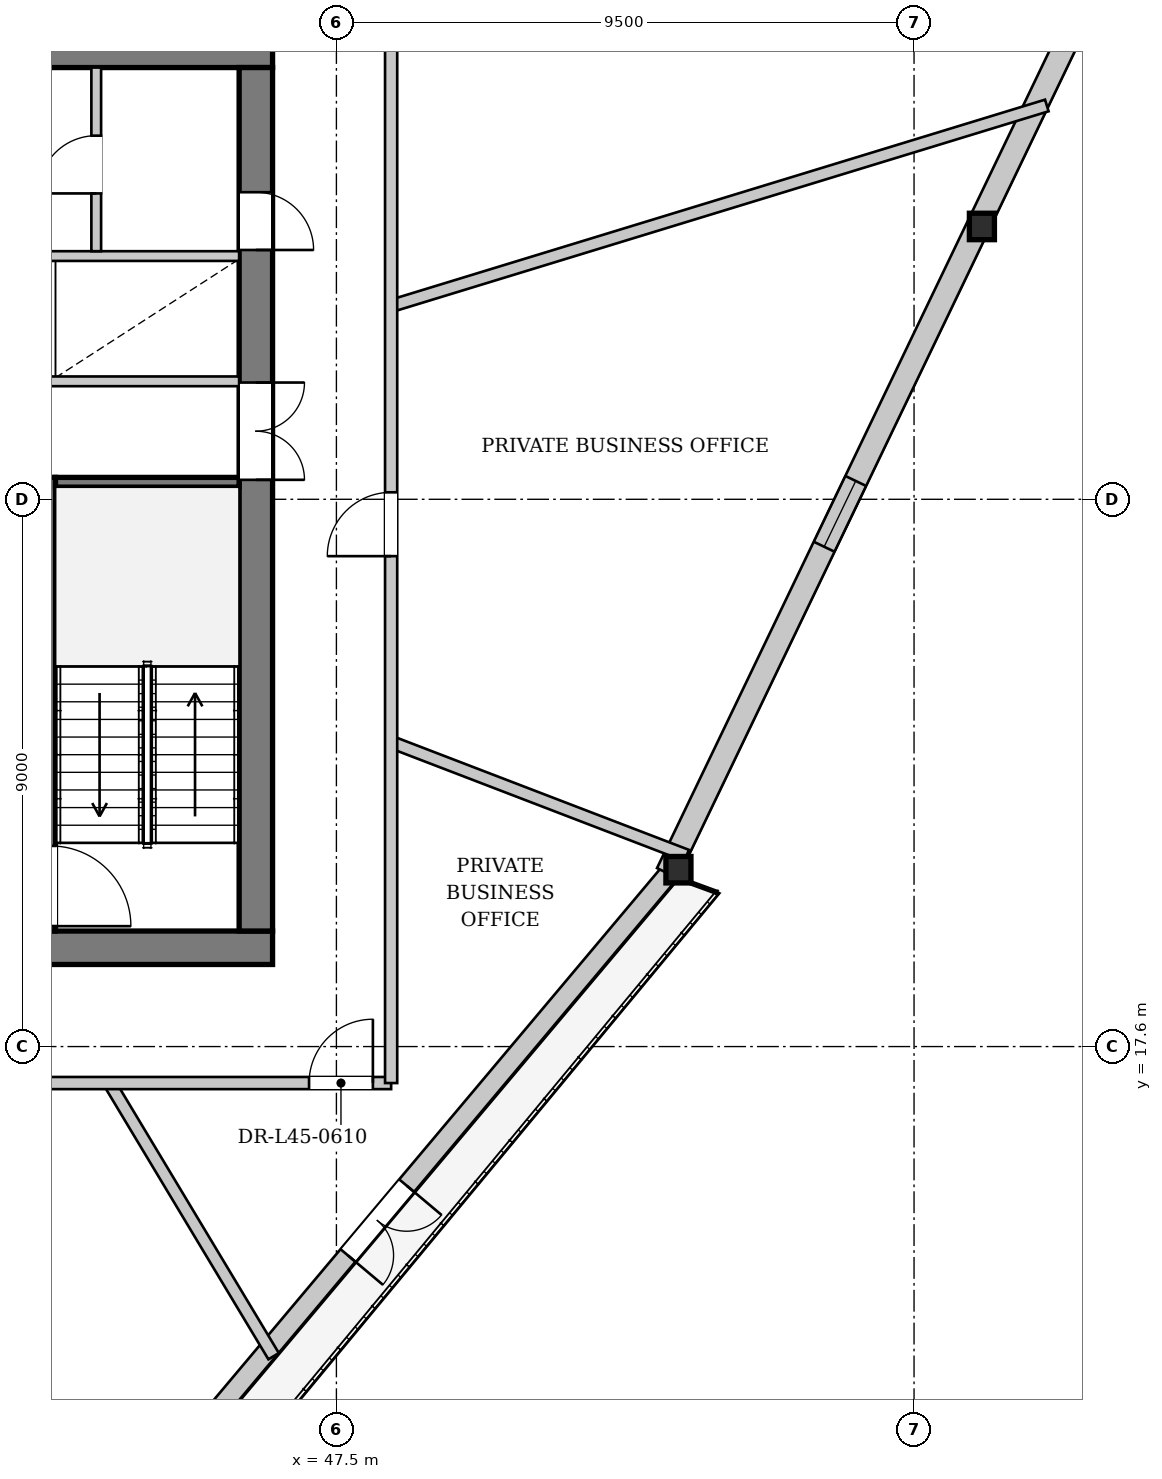
"""IFC4 building model, lengths in metres.
Left out: names, types, materials, properties, quantities, classifications, styles, units other than length and angle.
Written with IfcOpenShell. Run it as: python <this file> out.ifc"""

import sys

from ifc_helpers import new_model, si_unit, direction, frame, frame_2d, origin, origin_2d, place, context, subcontext, project, spatial, rectangle, i_section, extrude, source, transform, mapped, element, fill, save


model = new_model("IFC4")
c1 = context("Model", 3, precision=1e-05, world=origin(), true_north=direction((0.0, 1.0)))
c2 = subcontext(c1, "Body", "Model", "MODEL_VIEW")
j1 = project(units=[si_unit("LENGTHUNIT", "METRE"), si_unit("PLANEANGLEUNIT", "RADIAN")], contexts=[c1])
p1 = place(None, origin())
s1 = spatial("IfcSite", under=j1, at=p1, CompositionType="ELEMENT")
p2 = place(p1, origin())
s2 = spatial("IfcBuilding", under=s1, at=p2, CompositionType="ELEMENT")
p3 = place(p2, frame((0.0, 0.0, 171.45)))
s3 = spatial("IfcBuildingStorey", under=s2, at=p3, CompositionType="ELEMENT", Elevation=171.45)
m1 = source(origin(), c2, "Body", "SweptSolid", [
    extrude(i_section(OverallWidth=0.412, OverallDepth=0.435, WebThickness=0.031, FlangeThickness=0.05, at=origin_2d()), origin(), (0.0, 0.0, 1.0), 3.396),
])
p4 = place(p3, frame((53.115, 20.37, 0.0), z_axis=(0.005750660519, 0.081443729594, 0.996661351119), x_axis=(-0.997516467009, 0.07043364286, 0.0)))
e1 = element("IfcColumn", 1, at=p4, inside=s3, PredefinedType="COLUMN", context=c2, shape_type="MappedRepresentation", body=[
    mapped(m1, transform((0.0, 0.0, 0.0), x_axis=(1.0, 0.0, 0.0), y_axis=(0.0, 1.0, 0.0), z_axis=(0.0, 0.0, 1.0), scale=1.0)),
])
m2 = source(origin(), c2, "Body", "SweptSolid", [
    extrude(i_section(OverallWidth=0.412, OverallDepth=0.435, WebThickness=0.031, FlangeThickness=0.05, at=origin_2d()), origin(), (0.0, 0.0, 1.0), 3.404),
])
p5 = place(p3, frame((58.182, 30.921, 0.0), z_axis=(-0.038804856025, 0.0971914601, 0.994508925668), x_axis=(-0.928712846652, -0.370799741726, 0.0)))
e2 = element("IfcColumn", 2, at=p5, inside=s3, PredefinedType="COLUMN", context=c2, shape_type="MappedRepresentation", body=[
    mapped(m2, transform((0.0, 0.0, 0.0), x_axis=(1.0, 0.0, 0.0), y_axis=(0.0, 1.0, 0.0), z_axis=(0.0, 0.0, 1.0), scale=1.0)),
])
p6 = place(p3, frame((52.993, 20.473, 0.0), z_axis=(0.0, 0.0, 1.0), x_axis=(-0.643470383852, -0.765471008664, 0.0)))
e3 = element("IfcWall", 3, at=p6, inside=s3, PredefinedType="SOLIDWALL", context=c2, shape_type="SweptSolid", body=[
    extrude(rectangle(XDim=23.409, YDim=0.32, at=frame_2d((11.705, 0.0))), origin(), (0.0, 0.0, 1.0), 2.722),
])
p7 = place(p6, frame((6.741, 0.0, 0.0)))
e4 = element("IfcOpeningElement", 4, at=p7, cuts=e3, PredefinedType="OPENING", context=c2, shape_type="SweptSolid", body=[
    extrude(rectangle(XDim=1.5, YDim=2.3, at=frame_2d((0.75, 1.15))), frame((0.0, 0.17, 0.0), z_axis=(0.0, -1.0, 0.0), x_axis=(1.0, 0.0, 0.0)), (0.0, 0.0, 1.0), 0.34),
])
p8 = place(p6, frame((16.023, 0.0, 0.252)))
e5 = element("IfcOpeningElement", 5, at=p8, cuts=e3, PredefinedType="OPENING", context=c2, shape_type="SweptSolid", body=[
    extrude(rectangle(XDim=2.6, YDim=2.35, at=frame_2d((1.3, 1.175))), frame((0.0, 0.17, 0.0), z_axis=(0.0, -1.0, 0.0), x_axis=(1.0, 0.0, 0.0)), (0.0, 0.0, 1.0), 0.34),
])
p9 = place(p3, frame((63.077, 41.555, 0.0), z_axis=(0.0, 0.0, 1.0), x_axis=(-0.432876854569, -0.901453065211, 0.0)))
e6 = element("IfcWall", 6, at=p9, inside=s3, PredefinedType="SOLIDWALL", context=c2, shape_type="SweptSolid", body=[
    extrude(rectangle(XDim=23.409, YDim=0.38, at=frame_2d((11.705, 0.0))), origin(), (0.0, 0.0, 1.0), 2.722),
])
p10 = place(p9, frame((5.955, 0.0, 0.65)))
e7 = element("IfcOpeningElement", 7, at=p10, cuts=e6, PredefinedType="OPENING", context=c2, shape_type="SweptSolid", body=[
    extrude(rectangle(XDim=1.2, YDim=1.5, at=frame_2d((0.6, 0.75))), frame((0.0, 0.2, 0.0), z_axis=(0.0, -1.0, 0.0), x_axis=(1.0, 0.0, 0.0)), (0.0, 0.0, 1.0), 0.4),
])
p11 = place(p9, frame((16.255, 0.0, 0.65)))
e8 = element("IfcOpeningElement", 8, at=p11, cuts=e6, PredefinedType="OPENING", context=c2, shape_type="SweptSolid", body=[
    extrude(rectangle(XDim=1.2, YDim=1.5, at=frame_2d((0.6, 0.75))), frame((0.0, 0.2, 0.0), z_axis=(0.0, -1.0, 0.0), x_axis=(1.0, 0.0, 0.0)), (0.0, 0.0, 1.0), 0.4),
])
p12 = place(p3, frame((46.45, 19.225, 0.0), z_axis=(0.0, 0.0, 1.0), x_axis=(-1.0, 0.0, 0.0)))
e9 = element("IfcWall", 9, at=p12, inside=s3, PredefinedType="SHEAR", context=c2, shape_type="SweptSolid", body=[
    extrude(rectangle(XDim=16.9, YDim=0.55, at=frame_2d((8.45, 0.0))), origin(), (0.0, 0.0, 1.0), 3.33),
])
p13 = place(p12, frame((4.65, 0.0, 0.0)))
e10 = element("IfcOpeningElement", 10, at=p13, cuts=e9, PredefinedType="OPENING", context=c2, shape_type="SweptSolid", body=[
    extrude(rectangle(XDim=1.12, YDim=2.25, at=frame_2d((0.56, 1.125))), frame((0.0, 0.285, 0.0), z_axis=(0.0, -1.0, 0.0), x_axis=(1.0, 0.0, 0.0)), (0.0, 0.0, 1.0), 0.57),
])
p14 = place(p12, frame((11.15, 0.0, 0.0)))
e11 = element("IfcOpeningElement", 11, at=p14, cuts=e9, PredefinedType="OPENING", context=c2, shape_type="SweptSolid", body=[
    extrude(rectangle(XDim=1.12, YDim=2.25, at=frame_2d((0.56, 1.125))), frame((0.0, 0.285, 0.0), z_axis=(0.0, -1.0, 0.0), x_axis=(1.0, 0.0, 0.0)), (0.0, 0.0, 1.0), 0.57),
])
p15 = place(p3, frame((29.55, 33.975, 0.0), z_axis=(0.0, 0.0, 1.0), x_axis=(1.0, 0.0, 0.0)))
e12 = element("IfcWall", 12, at=p15, inside=s3, PredefinedType="SHEAR", context=c2, shape_type="SweptSolid", body=[
    extrude(rectangle(XDim=16.9, YDim=0.55, at=frame_2d((8.45, 0.0))), origin(), (0.0, 0.0, 1.0), 3.33),
])
p16 = place(p15, frame((1.55, 0.0, 0.0)))
e13 = element("IfcOpeningElement", 13, at=p16, cuts=e12, PredefinedType="OPENING", context=c2, shape_type="SweptSolid", body=[
    extrude(rectangle(XDim=0.95, YDim=2.1, at=frame_2d((0.475, 1.05))), frame((0.0, 0.285, 0.0), z_axis=(0.0, -1.0, 0.0), x_axis=(1.0, 0.0, 0.0)), (0.0, 0.0, 1.0), 0.57),
])
p17 = place(p15, frame((3.93, 0.0, 0.0)))
e14 = element("IfcOpeningElement", 14, at=p17, cuts=e12, PredefinedType="OPENING", context=c2, shape_type="SweptSolid", body=[
    extrude(rectangle(XDim=1.32, YDim=2.2, at=frame_2d((0.66, 1.1))), frame((0.0, 0.285, 0.0), z_axis=(0.0, -1.0, 0.0), x_axis=(1.0, 0.0, 0.0)), (0.0, 0.0, 1.0), 0.57),
])
p18 = place(p3, frame((46.175, 33.7, 0.0), z_axis=(0.0, 0.0, 1.0), x_axis=(0.0, -1.0, 0.0)))
e15 = element("IfcWall", 15, at=p18, inside=s3, PredefinedType="SHEAR", context=c2, shape_type="SweptSolid", body=[
    extrude(rectangle(XDim=14.2, YDim=0.55, at=frame_2d((7.1, 0.0))), origin(), (0.0, 0.0, 1.0), 3.33),
])
p19 = place(p18, frame((5.18, 0.0, 0.0)))
e16 = element("IfcOpeningElement", 16, at=p19, cuts=e15, PredefinedType="OPENING", context=c2, shape_type="SweptSolid", body=[
    extrude(rectangle(XDim=1.6, YDim=2.2, at=frame_2d((0.8, 1.1))), frame((0.0, 0.285, 0.0), z_axis=(0.0, -1.0, 0.0), x_axis=(1.0, 0.0, 0.0)), (0.0, 0.0, 1.0), 0.57),
])
p20 = place(p18, frame((2.05, 0.0, 0.0)))
e17 = element("IfcOpeningElement", 17, at=p20, cuts=e15, PredefinedType="OPENING", context=c2, shape_type="SweptSolid", body=[
    extrude(rectangle(XDim=0.95, YDim=2.1, at=frame_2d((0.475, 1.05))), frame((0.0, 0.285, 0.0), z_axis=(0.0, -1.0, 0.0), x_axis=(1.0, 0.0, 0.0)), (0.0, 0.0, 1.0), 0.57),
])
p21 = place(p3, frame((42.8, 26.96, 0.0), z_axis=(0.0, 0.0, 1.0), x_axis=(0.0, -1.0, 0.0)))
e18 = element("IfcWall", 18, at=p21, inside=s3, PredefinedType="PARTITIONING", context=c2, shape_type="SweptSolid", body=[
    extrude(rectangle(XDim=7.46, YDim=0.16, at=frame_2d((3.73, 0.0))), origin(), (0.0, 0.0, 1.0), 3.33),
])
p22 = place(p21, frame((6.06, 0.0, 0.0)))
e19 = element("IfcOpeningElement", 19, at=p22, cuts=e18, PredefinedType="OPENING", context=c2, shape_type="SweptSolid", body=[
    extrude(rectangle(XDim=1.32, YDim=2.2, at=frame_2d((0.66, 1.1))), frame((0.0, 0.09, 0.0), z_axis=(0.0, -1.0, 0.0), x_axis=(1.0, 0.0, 0.0)), (0.0, 0.0, 1.0), 0.18),
])
p23 = place(p3, frame((42.88, 26.88, 0.0), z_axis=(0.0, 0.0, 1.0), x_axis=(1.0, 0.0, 0.0)))
e20 = element("IfcWall", 20, at=p23, inside=s3, PredefinedType="PARTITIONING", context=c2, shape_type="SweptSolid", body=[
    extrude(rectangle(XDim=3.02, YDim=0.16, at=frame_2d((1.51, 0.0))), origin(), (0.0, 0.0, 1.0), 3.33),
])
p24 = place(p3, frame((33.28, 28.54, 0.0), z_axis=(0.0, 0.0, 1.0), x_axis=(1.0, 0.0, 0.0)))
e21 = element("IfcWall", 21, at=p24, inside=s3, PredefinedType="PARTITIONING", context=c2, shape_type="SweptSolid", body=[
    extrude(rectangle(XDim=12.62, YDim=0.16, at=frame_2d((6.31, 0.0))), origin(), (0.0, 0.0, 1.0), 3.33),
])
p25 = place(p24, frame((0.26, 0.0, 0.0)))
e22 = element("IfcOpeningElement", 22, at=p25, cuts=e21, PredefinedType="OPENING", context=c2, shape_type="SweptSolid", body=[
    extrude(rectangle(XDim=1.1, YDim=2.2, at=frame_2d((0.55, 1.1))), frame((0.0, 0.09, 0.0), z_axis=(0.0, -1.0, 0.0), x_axis=(1.0, 0.0, 0.0)), (0.0, 0.0, 1.0), 0.18),
])
p26 = place(p24, frame((2.01, 0.0, 0.0)))
e23 = element("IfcOpeningElement", 23, at=p26, cuts=e21, PredefinedType="OPENING", context=c2, shape_type="SweptSolid", body=[
    extrude(rectangle(XDim=1.1, YDim=2.2, at=frame_2d((0.55, 1.1))), frame((0.0, 0.09, 0.0), z_axis=(0.0, -1.0, 0.0), x_axis=(1.0, 0.0, 0.0)), (0.0, 0.0, 1.0), 0.18),
])
p27 = place(p24, frame((3.76, 0.0, 0.0)))
e24 = element("IfcOpeningElement", 24, at=p27, cuts=e21, PredefinedType="OPENING", context=c2, shape_type="SweptSolid", body=[
    extrude(rectangle(XDim=1.1, YDim=2.2, at=frame_2d((0.55, 1.1))), frame((0.0, 0.09, 0.0), z_axis=(0.0, -1.0, 0.0), x_axis=(1.0, 0.0, 0.0)), (0.0, 0.0, 1.0), 0.18),
])
p28 = place(p3, frame((40.72, 30.6, 0.0), z_axis=(0.0, 0.0, 1.0), x_axis=(1.0, 0.0, 0.0)))
e25 = element("IfcWall", 25, at=p28, inside=s3, PredefinedType="PARTITIONING", context=c2, shape_type="SweptSolid", body=[
    extrude(rectangle(XDim=5.18, YDim=0.16, at=frame_2d((2.59, 0.0))), origin(), (0.0, 0.0, 1.0), 3.33),
])
p29 = place(p3, frame((43.55, 30.68, 0.0), z_axis=(0.0, 0.0, 1.0), x_axis=(0.0, 1.0, 0.0)))
e26 = element("IfcWall", 26, at=p29, inside=s3, PredefinedType="PARTITIONING", context=c2, shape_type="SweptSolid", body=[
    extrude(rectangle(XDim=3.02, YDim=0.16, at=frame_2d((1.51, 0.0))), origin(), (0.0, 0.0, 1.0), 3.33),
])
p30 = place(p29, frame((0.95, 0.0, 0.0)))
e27 = element("IfcOpeningElement", 27, at=p30, cuts=e26, PredefinedType="OPENING", context=c2, shape_type="SweptSolid", body=[
    extrude(rectangle(XDim=0.95, YDim=2.1, at=frame_2d((0.475, 1.05))), frame((0.0, 0.09, 0.0), z_axis=(0.0, -1.0, 0.0), x_axis=(1.0, 0.0, 0.0)), (0.0, 0.0, 1.0), 0.18),
])
p31 = place(p3, frame((43.768, 17.0, 0.0), z_axis=(0.0, 0.0, 1.0), x_axis=(0.515030046978, -0.857172124319, 0.0)))
e28 = element("IfcWall", 28, at=p31, inside=s3, PredefinedType="PARTITIONING", context=c2, shape_type="SweptSolid", body=[
    extrude(rectangle(XDim=5.24, YDim=0.2, at=frame_2d((2.62, 0.0))), origin(), (0.0, 0.0, 1.0), 3.33),
])
p32 = place(p3, frame((48.4, 22.608, 0.0), z_axis=(0.0, 0.0, 1.0), x_axis=(0.933576236836, -0.358378863794, 0.0)))
e29 = element("IfcWall", 29, at=p32, inside=s3, PredefinedType="PARTITIONING", context=c2, shape_type="SweptSolid", body=[
    extrude(rectangle(XDim=5.207, YDim=0.2, at=frame_2d((2.604, 0.0))), origin(), (0.0, 0.0, 1.0), 2.865),
])
p33 = place(p3, frame((48.4, 29.78, 0.0), z_axis=(0.0, 0.0, 1.0), x_axis=(0.956305507795, 0.29236924558, 0.0)))
e30 = element("IfcWall", 30, at=p33, inside=s3, PredefinedType="PARTITIONING", context=c2, shape_type="SweptSolid", body=[
    extrude(rectangle(XDim=11.276, YDim=0.2, at=frame_2d((5.638, 0.0))), origin(), (0.0, 0.0, 1.0), 3.33),
])
p34 = place(p3, frame((27.6, 17.0, 0.0), z_axis=(0.0, 0.0, 1.0), x_axis=(1.0, 0.0, 0.0)))
e31 = element("IfcWall", 31, at=p34, inside=s3, PredefinedType="PARTITIONING", context=c2, shape_type="SweptSolid", body=[
    extrude(rectangle(XDim=20.8, YDim=0.2, at=frame_2d((10.4, 0.0))), origin(), (0.0, 0.0, 1.0), 3.33),
])
p35 = place(p34, frame((4.334, 0.0, 0.0)))
e32 = element("IfcOpeningElement", 32, at=p35, cuts=e31, PredefinedType="OPENING", context=c2, shape_type="SweptSolid", body=[
    extrude(rectangle(XDim=1.05, YDim=2.2, at=frame_2d((0.525, 1.1))), frame((0.0, 0.11, 0.0), z_axis=(0.0, -1.0, 0.0), x_axis=(1.0, 0.0, 0.0)), (0.0, 0.0, 1.0), 0.22),
])
p36 = place(p34, frame((10.739, 0.0, 0.0)))
e33 = element("IfcOpeningElement", 33, at=p36, cuts=e31, PredefinedType="OPENING", context=c2, shape_type="SweptSolid", body=[
    extrude(rectangle(XDim=1.05, YDim=2.2, at=frame_2d((0.525, 1.1))), frame((0.0, 0.11, 0.0), z_axis=(0.0, -1.0, 0.0), x_axis=(1.0, 0.0, 0.0)), (0.0, 0.0, 1.0), 0.22),
])
p37 = place(p34, frame((19.45, 0.0, 0.0)))
e34 = element("IfcOpeningElement", 34, at=p37, cuts=e31, PredefinedType="OPENING", context=c2, shape_type="SweptSolid", body=[
    extrude(rectangle(XDim=1.05, YDim=2.2, at=frame_2d((0.525, 1.1))), frame((0.0, 0.11, 0.0), z_axis=(0.0, -1.0, 0.0), x_axis=(1.0, 0.0, 0.0)), (0.0, 0.0, 1.0), 0.22),
])
p38 = place(p3, frame((48.4, 17.0, 0.0), z_axis=(0.0, 0.0, 1.0), x_axis=(0.0, 1.0, 0.0)))
e35 = element("IfcWall", 35, at=p38, inside=s3, PredefinedType="PARTITIONING", context=c2, shape_type="SweptSolid", body=[
    extrude(rectangle(XDim=19.2, YDim=0.2, at=frame_2d((9.6, 0.0))), origin(), (0.0, 0.0, 1.0), 3.33),
])
p39 = place(p38, frame((8.665, 0.0, 0.0)))
e36 = element("IfcOpeningElement", 36, at=p39, cuts=e35, PredefinedType="OPENING", context=c2, shape_type="SweptSolid", body=[
    extrude(rectangle(XDim=1.05, YDim=2.2, at=frame_2d((0.525, 1.1))), frame((0.0, 0.11, 0.0), z_axis=(0.0, -1.0, 0.0), x_axis=(1.0, 0.0, 0.0)), (0.0, 0.0, 1.0), 0.22),
])
m3 = source(origin(), c2, "Body", "SweptSolid", [
    extrude(rectangle(XDim=1.5, YDim=2.3, at=frame_2d((0.75, 1.15))), frame((0.0, 0.025, 0.0), z_axis=(0.0, -1.0, 0.0), x_axis=(1.0, 0.0, 0.0)), (0.0, 0.0, 1.0), 0.05),
])
p40 = place(p7, origin())
e37 = element("IfcDoor", 37, at=p40, inside=s3, OperationType="DOUBLE_DOOR_SINGLE_SWING", PredefinedType="DOOR", context=c2, shape_type="MappedRepresentation", body=[
    mapped(m3, transform((0.0, 0.0, 0.0), x_axis=(1.0, 0.0, 0.0), y_axis=(0.0, 1.0, 0.0), z_axis=(0.0, 0.0, 1.0), scale=1.0)),
])
fill(e4, e37)
m4 = source(origin(), c2, "Body", "SweptSolid", [
    extrude(rectangle(XDim=1.2, YDim=1.5, at=frame_2d((0.6, 0.75))), frame((0.0, 0.03, 0.0), z_axis=(0.0, -1.0, 0.0), x_axis=(1.0, 0.0, 0.0)), (0.0, 0.0, 1.0), 0.06),
])
p41 = place(p11, origin())
e38 = element("IfcWindow", 38, at=p41, inside=s3, PartitioningType="SINGLE_PANEL", PredefinedType="WINDOW", context=c2, shape_type="MappedRepresentation", body=[
    mapped(m4, transform((0.0, 0.0, 0.0), x_axis=(1.0, 0.0, 0.0), y_axis=(0.0, 1.0, 0.0), z_axis=(0.0, 0.0, 1.0), scale=1.0)),
])
fill(e8, e38)
m5 = source(origin(), c2, "Body", "SweptSolid", [
    extrude(rectangle(XDim=1.6, YDim=2.2, at=frame_2d((0.8, 1.1))), frame((0.0, 0.025, 0.0), z_axis=(0.0, -1.0, 0.0), x_axis=(1.0, 0.0, 0.0)), (0.0, 0.0, 1.0), 0.05),
])
p42 = place(p19, origin())
e39 = element("IfcDoor", 39, at=p42, inside=s3, OperationType="DOUBLE_DOOR_SINGLE_SWING", PredefinedType="DOOR", context=c2, shape_type="MappedRepresentation", body=[
    mapped(m5, transform((0.0, 0.0, 0.0), x_axis=(1.0, 0.0, 0.0), y_axis=(0.0, 1.0, 0.0), z_axis=(0.0, 0.0, 1.0), scale=1.0)),
])
fill(e16, e39)
m6 = source(origin(), c2, "Body", "SweptSolid", [
    extrude(rectangle(XDim=0.95, YDim=2.1, at=frame_2d((0.475, 1.05))), frame((0.0, 0.025, 0.0), z_axis=(0.0, -1.0, 0.0), x_axis=(1.0, 0.0, 0.0)), (0.0, 0.0, 1.0), 0.05),
])
p43 = place(p30, origin())
e40 = element("IfcDoor", 40, at=p43, inside=s3, OperationType="SINGLE_SWING_LEFT", PredefinedType="DOOR", context=c2, shape_type="MappedRepresentation", body=[
    mapped(m6, transform((0.0, 0.0, 0.0), x_axis=(1.0, 0.0, 0.0), y_axis=(0.0, 1.0, 0.0), z_axis=(0.0, 0.0, 1.0), scale=1.0)),
])
fill(e27, e40)
p44 = place(p20, origin())
e41 = element("IfcDoor", 41, at=p44, inside=s3, OperationType="SINGLE_SWING_RIGHT", PredefinedType="DOOR", context=c2, shape_type="MappedRepresentation", body=[
    mapped(m6, transform((0.0, 0.0, 0.0), x_axis=(1.0, 0.0, 0.0), y_axis=(0.0, 1.0, 0.0), z_axis=(0.0, 0.0, 1.0), scale=1.0)),
])
fill(e17, e41)
m7 = source(origin(), c2, "Body", "SweptSolid", [
    extrude(rectangle(XDim=1.05, YDim=2.2, at=frame_2d((0.525, 1.1))), frame((0.0, 0.025, 0.0), z_axis=(0.0, -1.0, 0.0), x_axis=(1.0, 0.0, 0.0)), (0.0, 0.0, 1.0), 0.05),
])
p45 = place(p37, origin())
e42 = element("IfcDoor", 42, at=p45, inside=s3, OperationType="SINGLE_SWING_RIGHT", PredefinedType="DOOR", context=c2, shape_type="MappedRepresentation", body=[
    mapped(m7, transform((0.0, 0.0, 0.0), x_axis=(1.0, 0.0, 0.0), y_axis=(0.0, 1.0, 0.0), z_axis=(0.0, 0.0, 1.0), scale=1.0)),
])
fill(e34, e42)
p46 = place(p39, origin())
e43 = element("IfcDoor", 43, at=p46, inside=s3, OperationType="SINGLE_SWING_LEFT", PredefinedType="DOOR", context=c2, shape_type="MappedRepresentation", body=[
    mapped(m7, transform((0.0, 0.0, 0.0), x_axis=(1.0, 0.0, 0.0), y_axis=(0.0, 1.0, 0.0), z_axis=(0.0, 0.0, 1.0), scale=1.0)),
])
fill(e36, e43)
save(model, sys.argv[1])
